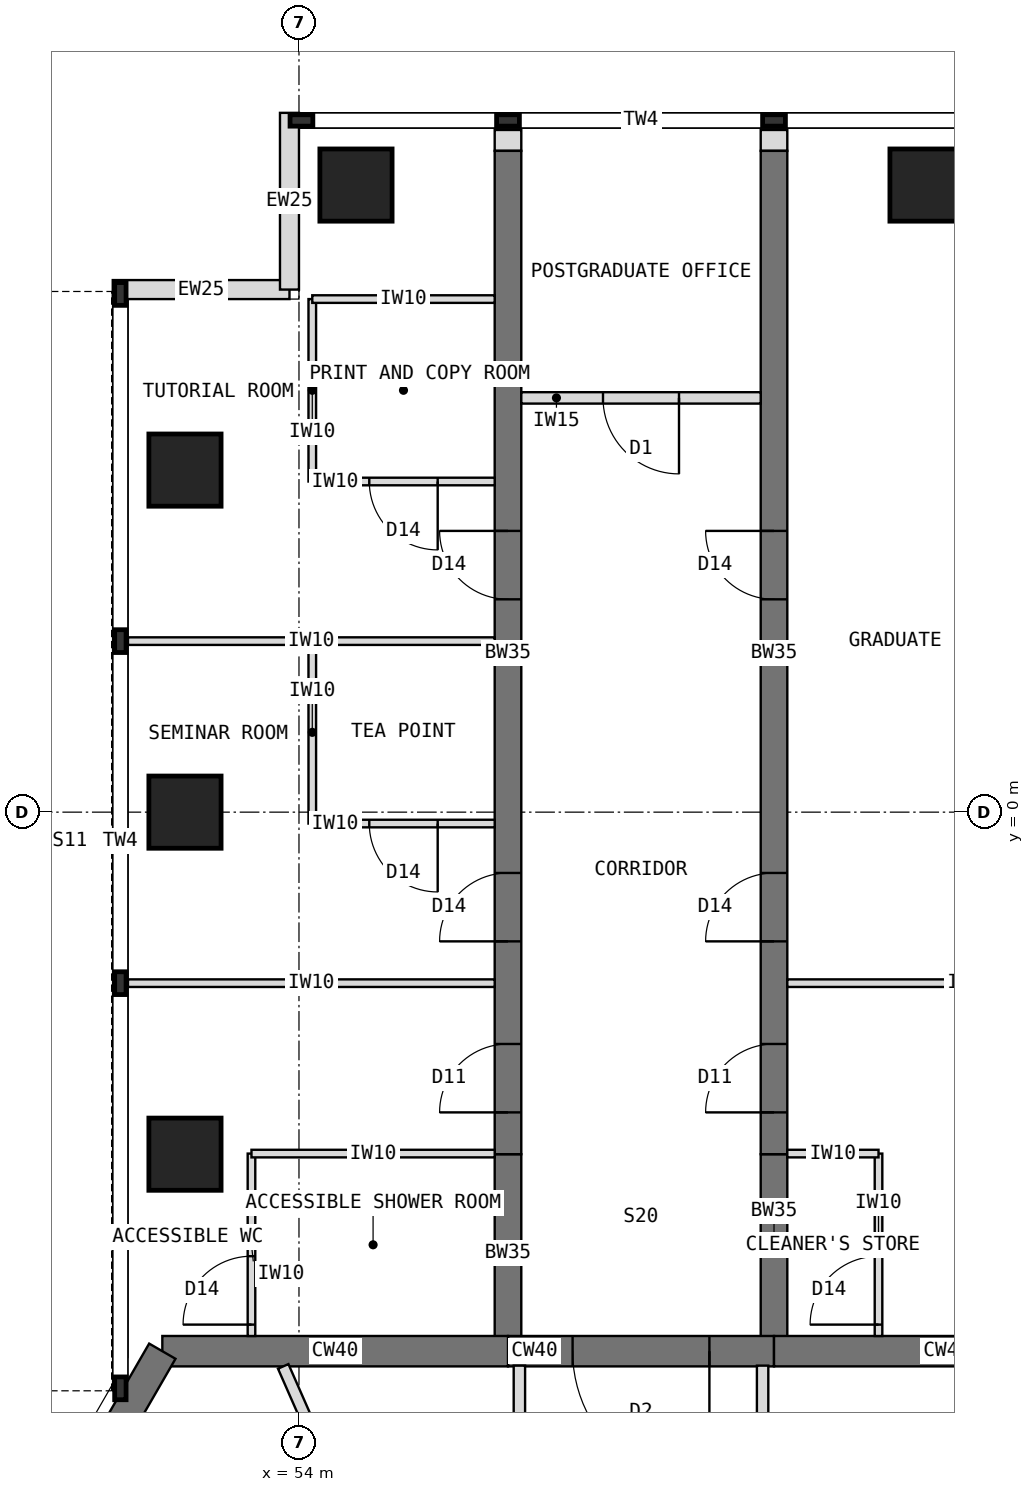
"""IFC4 building model, lengths in metres.
Left out: names, types, materials, properties, quantities, classifications, styles, units other than length and angle.
Written with IfcOpenShell. Run it as: python <this file> out.ifc"""

import sys

from ifc_helpers import new_model, si_unit, direction, frame, frame_2d, origin, origin_2d, place, context, subcontext, project, spatial, rectangle, extrude, element, fill, save


model = new_model("IFC4")
c1 = context("Model", 3, precision=1e-05, world=origin(), true_north=direction((0.0, 1.0)))
c2 = subcontext(c1, "Body", "Model", "MODEL_VIEW")
j1 = project(units=[si_unit("LENGTHUNIT", "METRE"), si_unit("PLANEANGLEUNIT", "RADIAN")], contexts=[c1])
p1 = place(None, origin())
s1 = spatial("IfcSite", under=j1, at=p1, CompositionType="ELEMENT")
p2 = place(p1, origin())
s2 = spatial("IfcBuilding", under=s1, at=p2, CompositionType="ELEMENT")
p3 = place(p2, frame((0.0, 0.0, 267.5)))
s3 = spatial("IfcBuildingStorey", under=s2, at=p3, CompositionType="ELEMENT", Elevation=267.5)
p4 = place(p3, frame((64.798, -7.092, 0.0), z_axis=(0.0, 0.0, 1.0), x_axis=(-1.0, 0.0, 0.0)))
e1 = element("IfcWall", 1, at=p4, inside=s3, PredefinedType="SHEAR", context=c2, shape_type="SweptSolid", body=[
    extrude(rectangle(XDim=4.548, YDim=0.4, at=frame_2d((2.274, 0.0))), origin(), (0.0, 0.0, 1.0), 4.0),
])
p5 = place(p3, frame((60.25, -7.092, 0.0), z_axis=(0.0, 0.0, 1.0), x_axis=(-1.0, 0.0, 0.0)))
e2 = element("IfcWall", 2, at=p5, inside=s3, PredefinedType="SHEAR", context=c2, shape_type="SweptSolid", body=[
    extrude(rectangle(XDim=3.5, YDim=0.4, at=frame_2d((1.75, 0.0))), origin(), (0.0, 0.0, 1.0), 4.0),
])
p6 = place(p5, frame((0.85, 0.0, 0.0)))
e3 = element("IfcOpeningElement", 3, at=p6, cuts=e2, PredefinedType="OPENING", context=c2, shape_type="SweptSolid", body=[
    extrude(rectangle(XDim=1.8, YDim=2.1, at=frame_2d((0.9, 1.05))), frame((0.0, 0.21, 0.0), z_axis=(0.0, -1.0, 0.0), x_axis=(1.0, 0.0, 0.0)), (0.0, 0.0, 1.0), 0.42),
])
p7 = place(p3, frame((56.75, -7.092, 0.0), z_axis=(0.0, 0.0, 1.0), x_axis=(-1.0, 0.0, 0.0)))
e4 = element("IfcWall", 4, at=p7, inside=s3, PredefinedType="SHEAR", context=c2, shape_type="SweptSolid", body=[
    extrude(rectangle(XDim=4.548, YDim=0.4, at=frame_2d((2.274, 0.0))), origin(), (0.0, 0.0, 1.0), 4.0),
])
p8 = place(p3, frame((52.202, -7.092, 0.0), z_axis=(0.0, 0.0, 1.0), x_axis=(-0.500005998175, -0.866021940709, 0.0)))
e5 = element("IfcWall", 5, at=p8, inside=s3, PredefinedType="SHEAR", context=c2, shape_type="SweptSolid", body=[
    extrude(rectangle(XDim=12.596, YDim=0.4, at=frame_2d((6.298, 0.0))), origin(), (0.0, 0.0, 1.0), 4.0),
])
p9 = place(p3, frame((56.75, -7.092, 0.0), z_axis=(0.0, 0.0, 1.0), x_axis=(0.0, 1.0, 0.0)))
e6 = element("IfcWall", 6, at=p9, inside=s3, PredefinedType="SHEAR", context=c2, shape_type="SweptSolid", body=[
    extrude(rectangle(XDim=2.592, YDim=0.35, at=frame_2d((1.296, 0.0))), origin(), (0.0, 0.0, 1.0), 4.0),
])
p10 = place(p3, frame((56.75, -4.5, 0.0), z_axis=(0.0, 0.0, 1.0), x_axis=(0.0, 1.0, 0.0)))
e7 = element("IfcWall", 7, at=p10, inside=s3, PredefinedType="SHEAR", context=c2, shape_type="SweptSolid", body=[
    extrude(rectangle(XDim=13.2, YDim=0.35, at=frame_2d((6.6, 0.0))), origin(), (0.0, 0.0, 1.0), 4.0),
])
p11 = place(p10, frame((0.55, 0.0, 0.0)))
e8 = element("IfcOpeningElement", 8, at=p11, cuts=e7, PredefinedType="OPENING", context=c2, shape_type="SweptSolid", body=[
    extrude(rectangle(XDim=0.9, YDim=2.1, at=frame_2d((0.45, 1.05))), frame((0.0, 0.185, 0.0), z_axis=(0.0, -1.0, 0.0), x_axis=(1.0, 0.0, 0.0)), (0.0, 0.0, 1.0), 0.37),
])
p12 = place(p10, frame((2.8, 0.0, 0.0)))
e9 = element("IfcOpeningElement", 9, at=p12, cuts=e7, PredefinedType="OPENING", context=c2, shape_type="SweptSolid", body=[
    extrude(rectangle(XDim=0.9, YDim=2.1, at=frame_2d((0.45, 1.05))), frame((0.0, 0.185, 0.0), z_axis=(0.0, -1.0, 0.0), x_axis=(1.0, 0.0, 0.0)), (0.0, 0.0, 1.0), 0.37),
])
p13 = place(p10, frame((7.3, 0.0, 0.0)))
e10 = element("IfcOpeningElement", 10, at=p13, cuts=e7, PredefinedType="OPENING", context=c2, shape_type="SweptSolid", body=[
    extrude(rectangle(XDim=0.9, YDim=2.1, at=frame_2d((0.45, 1.05))), frame((0.0, 0.185, 0.0), z_axis=(0.0, -1.0, 0.0), x_axis=(1.0, 0.0, 0.0)), (0.0, 0.0, 1.0), 0.37),
])
p14 = place(p3, frame((60.25, -7.092, 0.0), z_axis=(0.0, 0.0, 1.0), x_axis=(0.0, 1.0, 0.0)))
e11 = element("IfcWall", 11, at=p14, inside=s3, PredefinedType="SHEAR", context=c2, shape_type="SweptSolid", body=[
    extrude(rectangle(XDim=2.592, YDim=0.35, at=frame_2d((1.296, 0.0))), origin(), (0.0, 0.0, 1.0), 4.0),
])
p15 = place(p3, frame((60.25, -4.5, 0.0), z_axis=(0.0, 0.0, 1.0), x_axis=(0.0, 1.0, 0.0)))
e12 = element("IfcWall", 12, at=p15, inside=s3, PredefinedType="SHEAR", context=c2, shape_type="SweptSolid", body=[
    extrude(rectangle(XDim=13.2, YDim=0.35, at=frame_2d((6.6, 0.0))), origin(), (0.0, 0.0, 1.0), 4.0),
])
p16 = place(p15, frame((0.55, 0.0, 0.0)))
e13 = element("IfcOpeningElement", 13, at=p16, cuts=e12, PredefinedType="OPENING", context=c2, shape_type="SweptSolid", body=[
    extrude(rectangle(XDim=0.9, YDim=2.1, at=frame_2d((0.45, 1.05))), frame((0.0, 0.185, 0.0), z_axis=(0.0, -1.0, 0.0), x_axis=(1.0, 0.0, 0.0)), (0.0, 0.0, 1.0), 0.37),
])
p17 = place(p15, frame((2.8, 0.0, 0.0)))
e14 = element("IfcOpeningElement", 14, at=p17, cuts=e12, PredefinedType="OPENING", context=c2, shape_type="SweptSolid", body=[
    extrude(rectangle(XDim=0.9, YDim=2.1, at=frame_2d((0.45, 1.05))), frame((0.0, 0.185, 0.0), z_axis=(0.0, -1.0, 0.0), x_axis=(1.0, 0.0, 0.0)), (0.0, 0.0, 1.0), 0.37),
])
p18 = place(p15, frame((7.3, 0.0, 0.0)))
e15 = element("IfcOpeningElement", 15, at=p18, cuts=e12, PredefinedType="OPENING", context=c2, shape_type="SweptSolid", body=[
    extrude(rectangle(XDim=0.9, YDim=2.1, at=frame_2d((0.45, 1.05))), frame((0.0, 0.185, 0.0), z_axis=(0.0, -1.0, 0.0), x_axis=(1.0, 0.0, 0.0)), (0.0, 0.0, 1.0), 0.37),
])
for number, where, z_axis, x_axis in (
    (16, (52.5, -4.5, 0.0), (0.0, 0.0, 1.0), (1.0, 0.0, 0.0)),
    (17, (52.5, 0.0, 0.0), (0.0, 0.0, 1.0), (1.0, 0.0, 0.0)),
    (18, (52.5, 4.5, 0.0), (0.0, 0.0, 1.0), (1.0, 0.0, 0.0)),
    (19, (54.75, 8.25, 0.0), (0.0, 0.0, 1.0), (1.0, 0.0, 0.0)),
    (20, (62.25, 8.25, 0.0), (0.0, 0.0, 1.0), (1.0, 0.0, 0.0)),
):
    element("IfcColumn", number, at=place(p3, frame(where, z_axis=z_axis, x_axis=x_axis)), inside=s3, PredefinedType="COLUMN", context=c2, shape_type="SweptSolid", body=[
        extrude(rectangle(XDim=0.95, YDim=0.95, at=origin_2d()), origin(), (0.0, 0.0, 1.0), 4.0),
    ])
for number, where, z_axis, x_axis in (
    (21, (51.55, 6.875, 0.0), (0.0, 0.0, 1.0), (1.0, 0.0, 0.0)),
    (22, (53.875, 6.875, 0.0), (0.0, 0.0, 1.0), (0.0, 1.0, 0.0)),
):
    element("IfcWall", number, at=place(p3, frame(where, z_axis=z_axis, x_axis=x_axis)), inside=s3, PredefinedType="STANDARD", context=c2, shape_type="SweptSolid", body=[
        extrude(rectangle(XDim=2.325, YDim=0.25, at=frame_2d((1.163, 0.0))), origin(), (0.0, 0.0, 1.0), 3.8),
    ])
for number, where, z_axis, x_axis in (
    (23, (56.75, 8.7, 0.0), (0.0, 0.0, 1.0), (0.0, 1.0, 0.0)),
    (24, (60.25, 8.7, 0.0), (0.0, 0.0, 1.0), (0.0, 1.0, 0.0)),
):
    element("IfcWall", number, at=place(p3, frame(where, z_axis=z_axis, x_axis=x_axis)), inside=s3, PredefinedType="PARTITIONING", context=c2, shape_type="SweptSolid", body=[
        extrude(rectangle(XDim=0.275, YDim=0.35, at=frame_2d((0.138, 0.0))), origin(), (0.0, 0.0, 1.0), 3.8),
    ])
for number, where, z_axis, x_axis in (
    (25, (56.575, -2.25, 0.0), (0.0, 0.0, 1.0), (-1.0, 0.0, 0.0)),
    (26, (56.575, 2.25, 0.0), (0.0, 0.0, 1.0), (-1.0, 0.0, 0.0)),
):
    element("IfcWall", number, at=place(p3, frame(where, z_axis=z_axis, x_axis=x_axis)), inside=s3, PredefinedType="PARTITIONING", context=c2, shape_type="SweptSolid", body=[
        extrude(rectangle(XDim=4.825, YDim=0.1, at=frame_2d((2.413, 0.0))), origin(), (0.0, 0.0, 1.0), 3.8),
    ])
p19 = place(p3, frame((54.175, -0.15, 0.0), z_axis=(0.0, 0.0, 1.0), x_axis=(0.0, 1.0, 0.0)))
e27 = element("IfcWall", 27, at=p19, inside=s3, PredefinedType="PARTITIONING", context=c2, shape_type="SweptSolid", body=[
    extrude(rectangle(XDim=2.4, YDim=0.1, at=frame_2d((1.2, 0.0))), origin(), (0.0, 0.0, 1.0), 3.8),
])
p20 = place(p3, frame((56.575, -0.15, 0.0), z_axis=(0.0, 0.0, 1.0), x_axis=(-1.0, 0.0, 0.0)))
e28 = element("IfcWall", 28, at=p20, inside=s3, PredefinedType="PARTITIONING", context=c2, shape_type="SweptSolid", body=[
    extrude(rectangle(XDim=2.4, YDim=0.1, at=frame_2d((1.2, 0.0))), origin(), (0.0, 0.0, 1.0), 3.8),
])
p21 = place(p20, frame((0.75, 0.0, 0.0)))
e29 = element("IfcOpeningElement", 29, at=p21, cuts=e28, PredefinedType="OPENING", context=c2, shape_type="SweptSolid", body=[
    extrude(rectangle(XDim=0.9, YDim=2.1, at=frame_2d((0.45, 1.05))), frame((0.0, 0.06, 0.0), z_axis=(0.0, -1.0, 0.0), x_axis=(1.0, 0.0, 0.0)), (0.0, 0.0, 1.0), 0.12),
])
p22 = place(p3, frame((54.175, 4.35, 0.0), z_axis=(0.0, 0.0, 1.0), x_axis=(0.0, 1.0, 0.0)))
e30 = element("IfcWall", 30, at=p22, inside=s3, PredefinedType="PARTITIONING", context=c2, shape_type="SweptSolid", body=[
    extrude(rectangle(XDim=2.4, YDim=0.1, at=frame_2d((1.2, 0.0))), origin(), (0.0, 0.0, 1.0), 3.8),
])
p23 = place(p3, frame((56.575, 4.35, 0.0), z_axis=(0.0, 0.0, 1.0), x_axis=(-1.0, 0.0, 0.0)))
e31 = element("IfcWall", 31, at=p23, inside=s3, PredefinedType="PARTITIONING", context=c2, shape_type="SweptSolid", body=[
    extrude(rectangle(XDim=2.4, YDim=0.1, at=frame_2d((1.2, 0.0))), origin(), (0.0, 0.0, 1.0), 3.8),
])
p24 = place(p23, frame((0.75, 0.0, 0.0)))
e32 = element("IfcOpeningElement", 32, at=p24, cuts=e31, PredefinedType="OPENING", context=c2, shape_type="SweptSolid", body=[
    extrude(rectangle(XDim=0.9, YDim=2.1, at=frame_2d((0.45, 1.05))), frame((0.0, 0.06, 0.0), z_axis=(0.0, -1.0, 0.0), x_axis=(1.0, 0.0, 0.0)), (0.0, 0.0, 1.0), 0.12),
])
p25 = place(p3, frame((56.575, 6.75, 0.0), z_axis=(0.0, 0.0, 1.0), x_axis=(-1.0, 0.0, 0.0)))
e33 = element("IfcWall", 33, at=p25, inside=s3, PredefinedType="PARTITIONING", context=c2, shape_type="SweptSolid", body=[
    extrude(rectangle(XDim=2.4, YDim=0.1, at=frame_2d((1.2, 0.0))), origin(), (0.0, 0.0, 1.0), 3.8),
])
p26 = place(p3, frame((53.375, -6.892, 0.0), z_axis=(0.0, 0.0, 1.0), x_axis=(0.0, 1.0, 0.0)))
e34 = element("IfcWall", 34, at=p26, inside=s3, PredefinedType="PARTITIONING", context=c2, shape_type="SweptSolid", body=[
    extrude(rectangle(XDim=2.4, YDim=0.1, at=frame_2d((1.2, 0.0))), origin(), (0.0, 0.0, 1.0), 3.8),
])
p27 = place(p26, frame((0.15, 0.0, 0.0)))
e35 = element("IfcOpeningElement", 35, at=p27, cuts=e34, PredefinedType="OPENING", context=c2, shape_type="SweptSolid", body=[
    extrude(rectangle(XDim=0.9, YDim=2.1, at=frame_2d((0.45, 1.05))), frame((0.0, 0.06, 0.0), z_axis=(0.0, -1.0, 0.0), x_axis=(1.0, 0.0, 0.0)), (0.0, 0.0, 1.0), 0.12),
])
p28 = place(p3, frame((56.575, -4.492, 0.0), z_axis=(0.0, 0.0, 1.0), x_axis=(-1.0, 0.0, 0.0)))
e36 = element("IfcWall", 36, at=p28, inside=s3, PredefinedType="PARTITIONING", context=c2, shape_type="SweptSolid", body=[
    extrude(rectangle(XDim=3.2, YDim=0.1, at=frame_2d((1.6, 0.0))), origin(), (0.0, 0.0, 1.0), 3.267),
])
p29 = place(p3, frame((60.425, -2.25, 0.0), z_axis=(0.0, 0.0, 1.0), x_axis=(1.0, 0.0, 0.0)))
e37 = element("IfcWall", 37, at=p29, inside=s3, PredefinedType="PARTITIONING", context=c2, shape_type="SweptSolid", body=[
    extrude(rectangle(XDim=4.825, YDim=0.1, at=frame_2d((2.413, 0.0))), origin(), (0.0, 0.0, 1.0), 3.8),
])
p30 = place(p3, frame((61.625, -6.892, 0.0), z_axis=(0.0, 0.0, 1.0), x_axis=(0.0, 1.0, 0.0)))
e38 = element("IfcWall", 38, at=p30, inside=s3, PredefinedType="PARTITIONING", context=c2, shape_type="SweptSolid", body=[
    extrude(rectangle(XDim=2.4, YDim=0.1, at=frame_2d((1.2, 0.0))), origin(), (0.0, 0.0, 1.0), 3.8),
])
p31 = place(p30, frame((0.15, 0.0, 0.0)))
e39 = element("IfcOpeningElement", 39, at=p31, cuts=e38, PredefinedType="OPENING", context=c2, shape_type="SweptSolid", body=[
    extrude(rectangle(XDim=0.9, YDim=2.1, at=frame_2d((0.45, 1.05))), frame((0.0, 0.06, 0.0), z_axis=(0.0, -1.0, 0.0), x_axis=(1.0, 0.0, 0.0)), (0.0, 0.0, 1.0), 0.12),
])
p32 = place(p3, frame((60.425, -4.492, 0.0), z_axis=(0.0, 0.0, 1.0), x_axis=(1.0, 0.0, 0.0)))
e40 = element("IfcWall", 40, at=p32, inside=s3, PredefinedType="PARTITIONING", context=c2, shape_type="SweptSolid", body=[
    extrude(rectangle(XDim=1.2, YDim=0.1, at=frame_2d((0.6, 0.0))), origin(), (0.0, 0.0, 1.0), 3.267),
])
p33 = place(p3, frame((56.9, -11.9, 0.0), z_axis=(0.0, 0.0, 1.0), x_axis=(0.0, 1.0, 0.0)))
e41 = element("IfcWall", 41, at=p33, inside=s3, PredefinedType="PARTITIONING", context=c2, shape_type="SweptSolid", body=[
    extrude(rectangle(XDim=4.618, YDim=0.15, at=frame_2d((2.309, 0.0))), origin(), (0.0, 0.0, 1.0), 3.8),
])
p34 = place(p33, frame((1.819, 0.0, 0.0)))
e42 = element("IfcOpeningElement", 42, at=p34, cuts=e41, PredefinedType="OPENING", context=c2, shape_type="SweptSolid", body=[
    extrude(rectangle(XDim=1.0, YDim=2.1, at=frame_2d((0.5, 1.05))), frame((0.0, 0.085, 0.0), z_axis=(0.0, -1.0, 0.0), x_axis=(1.0, 0.0, 0.0)), (0.0, 0.0, 1.0), 0.17),
])
p35 = place(p3, frame((60.1, -7.282, 0.0), z_axis=(0.0, 0.0, 1.0), x_axis=(0.0, -1.0, 0.0)))
e43 = element("IfcWall", 43, at=p35, inside=s3, PredefinedType="PARTITIONING", context=c2, shape_type="SweptSolid", body=[
    extrude(rectangle(XDim=4.618, YDim=0.15, at=frame_2d((2.309, 0.0))), origin(), (0.0, 0.0, 1.0), 3.8),
])
p36 = place(p35, frame((1.799, 0.0, 0.0)))
e44 = element("IfcOpeningElement", 44, at=p36, cuts=e43, PredefinedType="OPENING", context=c2, shape_type="SweptSolid", body=[
    extrude(rectangle(XDim=1.0, YDim=2.1, at=frame_2d((0.5, 1.05))), frame((0.0, 0.085, 0.0), z_axis=(0.0, -1.0, 0.0), x_axis=(1.0, 0.0, 0.0)), (0.0, 0.0, 1.0), 0.17),
])
p37 = place(p3, frame((55.711, -11.656, 0.0), z_axis=(0.0, 0.0, 1.0), x_axis=(-0.402457111937, 0.915438841787, 0.0)))
e45 = element("IfcWall", 45, at=p37, inside=s3, PredefinedType="PARTITIONING", context=c2, shape_type="SweptSolid", body=[
    extrude(rectangle(XDim=4.767, YDim=0.15, at=frame_2d((2.383, 0.0))), origin(), (0.0, 0.0, 1.0), 3.8),
])
p38 = place(p37, frame((1.883, 0.0, 0.0)))
e46 = element("IfcOpeningElement", 46, at=p38, cuts=e45, PredefinedType="OPENING", context=c2, shape_type="SweptSolid", body=[
    extrude(rectangle(XDim=1.0, YDim=2.1, at=frame_2d((0.5, 1.05))), frame((0.0, 0.085, 0.0), z_axis=(0.0, -1.0, 0.0), x_axis=(1.0, 0.0, 0.0)), (0.0, 0.0, 1.0), 0.17),
])
p39 = place(p3, frame((60.075, 5.45, 0.0), z_axis=(0.0, 0.0, 1.0), x_axis=(-1.0, 0.0, 0.0)))
e47 = element("IfcWall", 47, at=p39, inside=s3, PredefinedType="PARTITIONING", context=c2, shape_type="SweptSolid", body=[
    extrude(rectangle(XDim=3.15, YDim=0.15, at=frame_2d((1.575, 0.0))), origin(), (0.0, 0.0, 1.0), 3.8),
])
p40 = place(p39, frame((1.075, 0.0, 0.0)))
e48 = element("IfcOpeningElement", 48, at=p40, cuts=e47, PredefinedType="OPENING", context=c2, shape_type="SweptSolid", body=[
    extrude(rectangle(XDim=1.0, YDim=2.1, at=frame_2d((0.5, 1.05))), frame((0.0, 0.085, 0.0), z_axis=(0.0, -1.0, 0.0), x_axis=(1.0, 0.0, 0.0)), (0.0, 0.0, 1.0), 0.17),
])
p41 = place(p6, origin())
e49 = element("IfcDoor", 49, at=p41, inside=s3, OperationType="DOUBLE_DOOR_DOUBLE_SWING", PredefinedType="DOOR", context=c2, shape_type="SweptSolid", body=[
    extrude(rectangle(XDim=1.8, YDim=2.1, at=frame_2d((0.9, 1.05))), frame((0.0, 0.025, 0.0), z_axis=(0.0, -1.0, 0.0), x_axis=(1.0, 0.0, 0.0)), (0.0, 0.0, 1.0), 0.05),
])
fill(e3, e49)
p42 = place(p21, origin())
e50 = element("IfcDoor", 50, at=p42, inside=s3, OperationType="SINGLE_SWING_LEFT", PredefinedType="DOOR", context=c2, shape_type="SweptSolid", body=[
    extrude(rectangle(XDim=0.9, YDim=2.1, at=frame_2d((0.45, 1.05))), frame((0.0, 0.025, 0.0), z_axis=(0.0, -1.0, 0.0), x_axis=(1.0, 0.0, 0.0)), (0.0, 0.0, 1.0), 0.05),
])
fill(e29, e50)
p43 = place(p24, origin())
e51 = element("IfcDoor", 51, at=p43, inside=s3, OperationType="SINGLE_SWING_LEFT", PredefinedType="DOOR", context=c2, shape_type="SweptSolid", body=[
    extrude(rectangle(XDim=0.9, YDim=2.1, at=frame_2d((0.45, 1.05))), frame((0.0, 0.025, 0.0), z_axis=(0.0, -1.0, 0.0), x_axis=(1.0, 0.0, 0.0)), (0.0, 0.0, 1.0), 0.05),
])
fill(e32, e51)
p44 = place(p27, origin())
e52 = element("IfcDoor", 52, at=p44, inside=s3, OperationType="SINGLE_SWING_LEFT", PredefinedType="DOOR", context=c2, shape_type="SweptSolid", body=[
    extrude(rectangle(XDim=0.9, YDim=2.1, at=frame_2d((0.45, 1.05))), frame((0.0, 0.025, 0.0), z_axis=(0.0, -1.0, 0.0), x_axis=(1.0, 0.0, 0.0)), (0.0, 0.0, 1.0), 0.05),
])
fill(e35, e52)
p45 = place(p31, origin())
e53 = element("IfcDoor", 53, at=p45, inside=s3, OperationType="SINGLE_SWING_LEFT", PredefinedType="DOOR", context=c2, shape_type="SweptSolid", body=[
    extrude(rectangle(XDim=0.9, YDim=2.1, at=frame_2d((0.45, 1.05))), frame((0.0, 0.025, 0.0), z_axis=(0.0, -1.0, 0.0), x_axis=(1.0, 0.0, 0.0)), (0.0, 0.0, 1.0), 0.05),
])
fill(e39, e53)
p46 = place(p40, origin())
e54 = element("IfcDoor", 54, at=p46, inside=s3, OperationType="SINGLE_SWING_LEFT", PredefinedType="DOOR", context=c2, shape_type="SweptSolid", body=[
    extrude(rectangle(XDim=1.0, YDim=2.1, at=frame_2d((0.5, 1.05))), frame((0.0, 0.025, 0.0), z_axis=(0.0, -1.0, 0.0), x_axis=(1.0, 0.0, 0.0)), (0.0, 0.0, 1.0), 0.05),
])
fill(e48, e54)
p47 = place(p11, origin())
e55 = element("IfcDoor", 55, at=p47, inside=s3, OperationType="SINGLE_SWING_LEFT", PredefinedType="DOOR", context=c2, shape_type="SweptSolid", body=[
    extrude(rectangle(XDim=0.9, YDim=2.1, at=frame_2d((0.45, 1.05))), frame((0.0, 0.025, 0.0), z_axis=(0.0, -1.0, 0.0), x_axis=(1.0, 0.0, 0.0)), (0.0, 0.0, 1.0), 0.05),
])
fill(e8, e55)
p48 = place(p12, origin())
e56 = element("IfcDoor", 56, at=p48, inside=s3, OperationType="SINGLE_SWING_LEFT", PredefinedType="DOOR", context=c2, shape_type="SweptSolid", body=[
    extrude(rectangle(XDim=0.9, YDim=2.1, at=frame_2d((0.45, 1.05))), frame((0.0, 0.025, 0.0), z_axis=(0.0, -1.0, 0.0), x_axis=(1.0, 0.0, 0.0)), (0.0, 0.0, 1.0), 0.05),
])
fill(e9, e56)
p49 = place(p13, origin())
e57 = element("IfcDoor", 57, at=p49, inside=s3, OperationType="SINGLE_SWING_RIGHT", PredefinedType="DOOR", context=c2, shape_type="SweptSolid", body=[
    extrude(rectangle(XDim=0.9, YDim=2.1, at=frame_2d((0.45, 1.05))), frame((0.0, 0.025, 0.0), z_axis=(0.0, -1.0, 0.0), x_axis=(1.0, 0.0, 0.0)), (0.0, 0.0, 1.0), 0.05),
])
fill(e10, e57)
p50 = place(p16, origin())
e58 = element("IfcDoor", 58, at=p50, inside=s3, OperationType="SINGLE_SWING_LEFT", PredefinedType="DOOR", context=c2, shape_type="SweptSolid", body=[
    extrude(rectangle(XDim=0.9, YDim=2.1, at=frame_2d((0.45, 1.05))), frame((0.0, 0.025, 0.0), z_axis=(0.0, -1.0, 0.0), x_axis=(1.0, 0.0, 0.0)), (0.0, 0.0, 1.0), 0.05),
])
fill(e13, e58)
p51 = place(p17, origin())
e59 = element("IfcDoor", 59, at=p51, inside=s3, OperationType="SINGLE_SWING_LEFT", PredefinedType="DOOR", context=c2, shape_type="SweptSolid", body=[
    extrude(rectangle(XDim=0.9, YDim=2.1, at=frame_2d((0.45, 1.05))), frame((0.0, 0.025, 0.0), z_axis=(0.0, -1.0, 0.0), x_axis=(1.0, 0.0, 0.0)), (0.0, 0.0, 1.0), 0.05),
])
fill(e14, e59)
p52 = place(p18, origin())
e60 = element("IfcDoor", 60, at=p52, inside=s3, OperationType="SINGLE_SWING_RIGHT", PredefinedType="DOOR", context=c2, shape_type="SweptSolid", body=[
    extrude(rectangle(XDim=0.9, YDim=2.1, at=frame_2d((0.45, 1.05))), frame((0.0, 0.025, 0.0), z_axis=(0.0, -1.0, 0.0), x_axis=(1.0, 0.0, 0.0)), (0.0, 0.0, 1.0), 0.05),
])
fill(e15, e60)
save(model, sys.argv[1])
